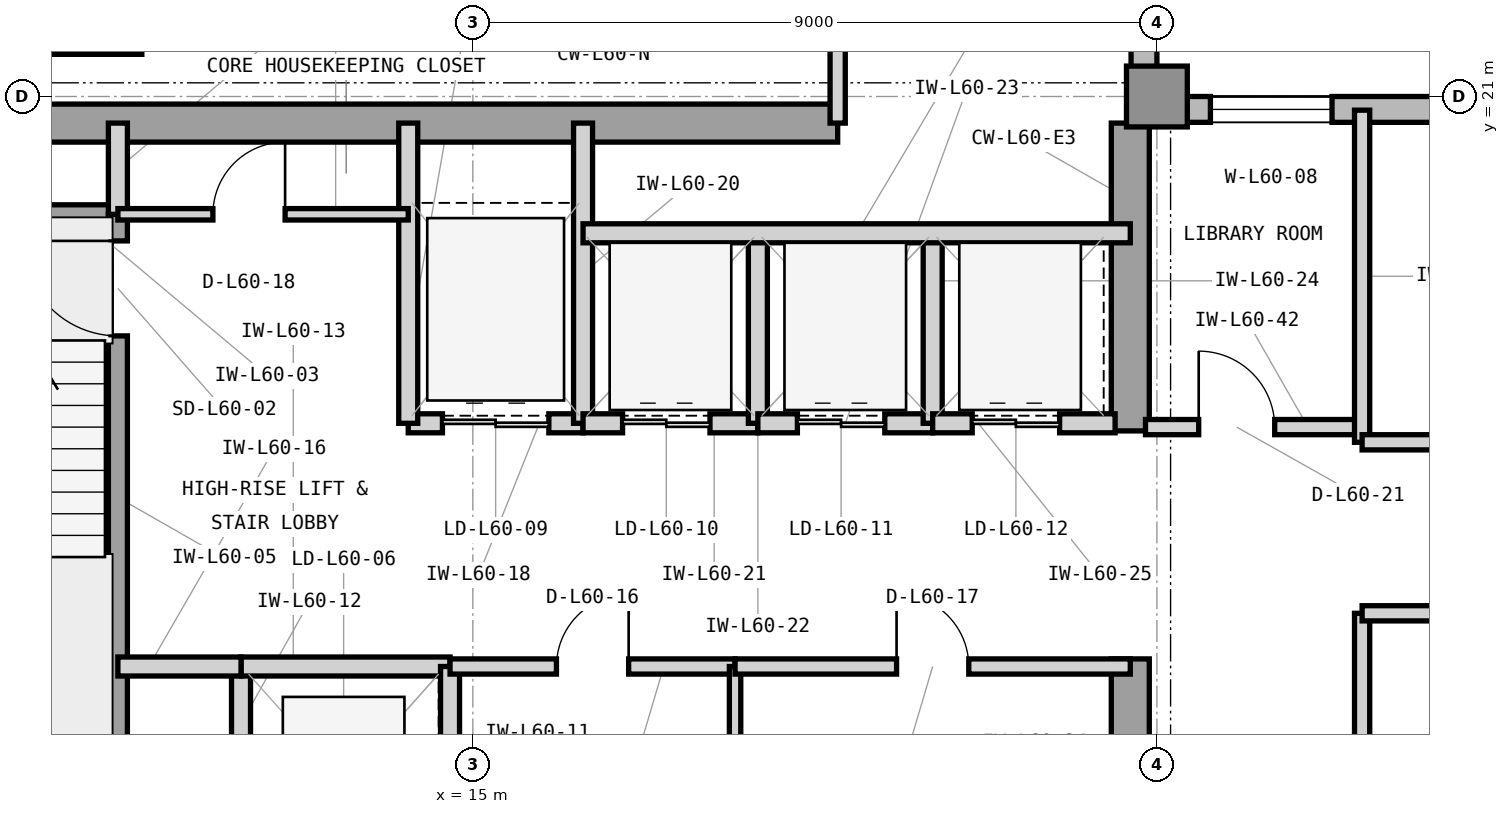
"""IFC4 building model, lengths in metres.
Left out: names, types, materials, properties, quantities, classifications, styles, units other than length and angle.
Written with IfcOpenShell. Run it as: python <this file> out.ifc"""

import sys

from ifc_helpers import new_model, si_unit, direction, frame, frame_2d, origin, origin_2d, place, context, subcontext, project, spatial, rectangle, extrude, element, fill, save


model = new_model("IFC4")
c1 = context("Model", 3, precision=1e-05, world=origin(), true_north=direction((0.0, 1.0)))
c2 = subcontext(c1, "Body", "Model", "MODEL_VIEW")
j1 = project(units=[si_unit("LENGTHUNIT", "METRE"), si_unit("PLANEANGLEUNIT", "RADIAN")], contexts=[c1])
p1 = place(None, origin())
s1 = spatial("IfcSite", under=j1, at=p1, CompositionType="ELEMENT")
p2 = place(p1, origin())
s2 = spatial("IfcBuilding", under=s1, at=p2, CompositionType="ELEMENT")
p3 = place(p2, frame((0.0, 0.0, 246.9)))
s3 = spatial("IfcBuildingStorey", under=s2, at=p3, CompositionType="ELEMENT", Elevation=246.9)
p4 = place(p3, frame((7.475, 20.65, 0.0), z_axis=(0.0, 0.0, 1.0), x_axis=(1.0, 0.0, 0.0)))
e1 = element("IfcWall", 1, at=p4, inside=s3, PredefinedType="SHEAR", context=c2, shape_type="SweptSolid", body=[
    extrude(rectangle(XDim=12.325, YDim=0.5, at=frame_2d((6.163, 0.0))), origin(), (0.0, 0.0, 1.0), 3.9),
])
p5 = place(p3, frame((23.65, 10.4, 0.0), z_axis=(0.0, 0.0, 1.0), x_axis=(0.0, 1.0, 0.0)))
e2 = element("IfcWall", 2, at=p5, inside=s3, PredefinedType="SHEAR", context=c2, shape_type="SweptSolid", body=[
    extrude(rectangle(XDim=3.2, YDim=0.5, at=frame_2d((1.6, 0.0))), origin(), (0.0, 0.0, 1.0), 3.9),
])
p6 = place(p3, frame((23.65, 16.6, 0.0), z_axis=(0.0, 0.0, 1.0), x_axis=(0.0, 1.0, 0.0)))
e3 = element("IfcWall", 3, at=p6, inside=s3, PredefinedType="SHEAR", context=c2, shape_type="SweptSolid", body=[
    extrude(rectangle(XDim=4.05, YDim=0.5, at=frame_2d((2.025, 0.0))), origin(), (0.0, 0.0, 1.0), 3.9),
])
p7 = place(p3, frame((24.0, 21.0, 0.0), z_axis=(0.0, 0.0, 1.0), x_axis=(1.0, 0.0, 0.0)))
e4 = element("IfcColumn", 4, at=p7, inside=s3, PredefinedType="COLUMN", context=c2, shape_type="SweptSolid", body=[
    extrude(rectangle(XDim=0.8, YDim=0.8, at=origin_2d()), origin(), (0.0, 0.0, 1.0), 3.9),
])
p8 = place(p3, frame((52.4, 20.83, 0.0), z_axis=(0.0, 0.0, 1.0), x_axis=(-1.0, 0.0, 0.0)))
e5 = element("IfcWall", 5, at=p8, inside=s3, PredefinedType="STANDARD", context=c2, shape_type="SweptSolid", body=[
    extrude(rectangle(XDim=28.4, YDim=0.34, at=frame_2d((14.2, 0.0))), origin(), (0.0, 0.0, 1.0), 3.7),
])
p9 = place(p8, frame((26.096, 0.0, 0.9)))
e6 = element("IfcOpeningElement", 6, at=p9, cuts=e5, PredefinedType="OPENING", context=c2, shape_type="SweptSolid", body=[
    extrude(rectangle(XDim=1.6, YDim=2.2, at=frame_2d((0.8, 1.1))), frame((0.0, 0.18, 0.0), z_axis=(0.0, -1.0, 0.0), x_axis=(1.0, 0.0, 0.0)), (0.0, 0.0, 1.0), 0.36),
])
p10 = place(p8, frame((11.375, 0.0, 0.9)))
e7 = element("IfcOpeningElement", 7, at=p10, cuts=e5, PredefinedType="OPENING", context=c2, shape_type="SweptSolid", body=[
    extrude(rectangle(XDim=2.3, YDim=2.2, at=frame_2d((1.15, 1.1))), frame((0.0, 0.18, 0.0), z_axis=(0.0, -1.0, 0.0), x_axis=(1.0, 0.0, 0.0)), (0.0, 0.0, 1.0), 0.36),
])
p11 = place(p3, frame((23.83, 21.0, 0.0), z_axis=(0.0, 0.0, 1.0), x_axis=(0.0, 1.0, 0.0)))
e8 = element("IfcWall", 8, at=p11, inside=s3, PredefinedType="STANDARD", context=c2, shape_type="SweptSolid", body=[
    extrude(rectangle(XDim=19.4, YDim=0.34, at=frame_2d((9.7, 0.0))), origin(), (0.0, 0.0, 1.0), 3.7),
])
p12 = place(p11, frame((10.975, 0.0, 0.9)))
e9 = element("IfcOpeningElement", 9, at=p12, cuts=e8, PredefinedType="OPENING", context=c2, shape_type="SweptSolid", body=[
    extrude(rectangle(XDim=2.3, YDim=2.2, at=frame_2d((1.15, 1.1))), frame((0.0, 0.18, 0.0), z_axis=(0.0, -1.0, 0.0), x_axis=(1.0, 0.0, 0.0)), (0.0, 0.0, 1.0), 0.36),
])
p13 = place(p3, frame((7.7, 19.45, 0.0), z_axis=(0.0, 0.0, 1.0), x_axis=(1.0, 0.0, 0.0)))
e10 = element("IfcWall", 10, at=p13, inside=s3, PredefinedType="SHEAR", context=c2, shape_type="SweptSolid", body=[
    extrude(rectangle(XDim=2.755, YDim=0.25, at=frame_2d((1.377, 0.0))), origin(), (0.0, 0.0, 1.0), 3.9),
])
p14 = place(p3, frame((10.33, 12.0, 0.0), z_axis=(0.0, 0.0, 1.0), x_axis=(0.0, 1.0, 0.0)))
e11 = element("IfcWall", 11, at=p14, inside=s3, PredefinedType="SHEAR", context=c2, shape_type="SweptSolid", body=[
    extrude(rectangle(XDim=7.45, YDim=0.25, at=frame_2d((3.725, 0.0))), origin(), (0.0, 0.0, 1.0), 3.9),
])
p15 = place(p14, frame((5.85, 0.0, 0.0)))
e12 = element("IfcOpeningElement", 12, at=p15, cuts=e11, PredefinedType="OPENING", context=c2, shape_type="SweptSolid", body=[
    extrude(rectangle(XDim=1.25, YDim=2.2, at=frame_2d((0.625, 1.1))), frame((0.0, 0.135, 0.0), z_axis=(0.0, -1.0, 0.0), x_axis=(1.0, 0.0, 0.0)), (0.0, 0.0, 1.0), 0.27),
])
p16 = place(p3, frame((10.33, 19.45, 0.0), z_axis=(0.0, 0.0, 1.0), x_axis=(0.0, 1.0, 0.0)))
e13 = element("IfcWall", 13, at=p16, inside=s3, PredefinedType="PARTITIONING", context=c2, shape_type="SweptSolid", body=[
    extrude(rectangle(XDim=1.2, YDim=0.25, at=frame_2d((0.6, 0.0))), origin(), (0.0, 0.0, 1.0), 3.69),
])
p17 = place(p3, frame((11.95, 10.5, 0.0), z_axis=(0.0, 0.0, 1.0), x_axis=(0.0, 1.0, 0.0)))
e14 = element("IfcWall", 14, at=p17, inside=s3, PredefinedType="PARTITIONING", context=c2, shape_type="SweptSolid", body=[
    extrude(rectangle(XDim=3.0, YDim=0.25, at=frame_2d((1.5, 0.0))), origin(), (0.0, 0.0, 1.0), 3.69),
])
p18 = place(p3, frame((11.95, 13.5, 0.0), z_axis=(0.0, 0.0, 1.0), x_axis=(1.0, 0.0, 0.0)))
e15 = element("IfcWall", 15, at=p18, inside=s3, PredefinedType="PARTITIONING", context=c2, shape_type="SweptSolid", body=[
    extrude(rectangle(XDim=2.75, YDim=0.25, at=frame_2d((1.375, 0.0))), origin(), (0.0, 0.0, 1.0), 3.073),
])
p19 = place(p3, frame((14.7, 10.5, 0.0), z_axis=(0.0, 0.0, 1.0), x_axis=(0.0, 1.0, 0.0)))
e16 = element("IfcWall", 16, at=p19, inside=s3, PredefinedType="PARTITIONING", context=c2, shape_type="SweptSolid", body=[
    extrude(rectangle(XDim=3.0, YDim=0.25, at=frame_2d((1.5, 0.0))), origin(), (0.0, 0.0, 1.0), 3.69),
])
p20 = place(p3, frame((10.33, 13.5, 0.0), z_axis=(0.0, 0.0, 1.0), x_axis=(1.0, 0.0, 0.0)))
e17 = element("IfcWall", 17, at=p20, inside=s3, PredefinedType="PARTITIONING", context=c2, shape_type="SweptSolid", body=[
    extrude(rectangle(XDim=1.62, YDim=0.25, at=frame_2d((0.81, 0.0))), origin(), (0.0, 0.0, 1.0), 3.073),
])
p21 = place(p3, frame((14.15, 16.7, 0.0), z_axis=(0.0, 0.0, 1.0), x_axis=(1.0, 0.0, 0.0)))
e18 = element("IfcWall", 18, at=p21, inside=s3, PredefinedType="PARTITIONING", context=c2, shape_type="SweptSolid", body=[
    extrude(rectangle(XDim=2.3, YDim=0.25, at=frame_2d((1.15, 0.0))), origin(), (0.0, 0.0, 1.0), 3.073),
])
p22 = place(p21, frame((0.45, 0.0, 0.0)))
e19 = element("IfcOpeningElement", 19, at=p22, cuts=e18, PredefinedType="OPENING", context=c2, shape_type="SweptSolid", body=[
    extrude(rectangle(XDim=1.4, YDim=2.35, at=frame_2d((0.7, 1.175))), frame((0.0, 0.135, 0.0), z_axis=(0.0, -1.0, 0.0), x_axis=(1.0, 0.0, 0.0)), (0.0, 0.0, 1.0), 0.27),
])
for number, where, z_axis, x_axis in (
    (20, (14.15, 16.7, 0.0), (0.0, 0.0, 1.0), (0.0, 1.0, 0.0)),
    (21, (16.45, 16.7, 0.0), (0.0, 0.0, 1.0), (0.0, 1.0, 0.0)),
):
    element("IfcWall", number, at=place(p3, frame(where, z_axis=z_axis, x_axis=x_axis)), inside=s3, PredefinedType="PARTITIONING", context=c2, shape_type="SweptSolid", body=[
        extrude(rectangle(XDim=3.95, YDim=0.25, at=frame_2d((1.975, 0.0))), origin(), (0.0, 0.0, 1.0), 3.69),
    ])
p23 = place(p3, frame((16.45, 16.7, 0.0), z_axis=(0.0, 0.0, 1.0), x_axis=(1.0, 0.0, 0.0)))
e22 = element("IfcWall", 22, at=p23, inside=s3, PredefinedType="PARTITIONING", context=c2, shape_type="SweptSolid", body=[
    extrude(rectangle(XDim=2.3, YDim=0.25, at=frame_2d((1.15, 0.0))), origin(), (0.0, 0.0, 1.0), 3.073),
])
p24 = place(p23, frame((0.52, 0.0, 0.0)))
e23 = element("IfcOpeningElement", 23, at=p24, cuts=e22, PredefinedType="OPENING", context=c2, shape_type="SweptSolid", body=[
    extrude(rectangle(XDim=1.15, YDim=2.25, at=frame_2d((0.575, 1.125))), frame((0.0, 0.135, 0.0), z_axis=(0.0, -1.0, 0.0), x_axis=(1.0, 0.0, 0.0)), (0.0, 0.0, 1.0), 0.27),
])
p25 = place(p3, frame((18.75, 16.7, 0.0), z_axis=(0.0, 0.0, 1.0), x_axis=(0.0, 1.0, 0.0)))
e24 = element("IfcWall", 24, at=p25, inside=s3, PredefinedType="PARTITIONING", context=c2, shape_type="SweptSolid", body=[
    extrude(rectangle(XDim=2.5, YDim=0.25, at=frame_2d((1.25, 0.0))), origin(), (0.0, 0.0, 1.0), 3.69),
])
p26 = place(p3, frame((18.75, 16.7, 0.0), z_axis=(0.0, 0.0, 1.0), x_axis=(1.0, 0.0, 0.0)))
e25 = element("IfcWall", 25, at=p26, inside=s3, PredefinedType="PARTITIONING", context=c2, shape_type="SweptSolid", body=[
    extrude(rectangle(XDim=2.3, YDim=0.25, at=frame_2d((1.15, 0.0))), origin(), (0.0, 0.0, 1.0), 3.073),
])
p27 = place(p26, frame((0.52, 0.0, 0.0)))
e26 = element("IfcOpeningElement", 26, at=p27, cuts=e25, PredefinedType="OPENING", context=c2, shape_type="SweptSolid", body=[
    extrude(rectangle(XDim=1.15, YDim=2.25, at=frame_2d((0.575, 1.125))), frame((0.0, 0.135, 0.0), z_axis=(0.0, -1.0, 0.0), x_axis=(1.0, 0.0, 0.0)), (0.0, 0.0, 1.0), 0.27),
])
p28 = place(p3, frame((21.05, 16.7, 0.0), z_axis=(0.0, 0.0, 1.0), x_axis=(0.0, 1.0, 0.0)))
e27 = element("IfcWall", 27, at=p28, inside=s3, PredefinedType="PARTITIONING", context=c2, shape_type="SweptSolid", body=[
    extrude(rectangle(XDim=2.5, YDim=0.25, at=frame_2d((1.25, 0.0))), origin(), (0.0, 0.0, 1.0), 3.69),
])
p29 = place(p3, frame((21.05, 16.7, 0.0), z_axis=(0.0, 0.0, 1.0), x_axis=(1.0, 0.0, 0.0)))
e28 = element("IfcWall", 28, at=p29, inside=s3, PredefinedType="PARTITIONING", context=c2, shape_type="SweptSolid", body=[
    extrude(rectangle(XDim=2.4, YDim=0.25, at=frame_2d((1.2, 0.0))), origin(), (0.0, 0.0, 1.0), 3.073),
])
p30 = place(p29, frame((0.52, 0.0, 0.0)))
e29 = element("IfcOpeningElement", 29, at=p30, cuts=e28, PredefinedType="OPENING", context=c2, shape_type="SweptSolid", body=[
    extrude(rectangle(XDim=1.15, YDim=2.25, at=frame_2d((0.575, 1.125))), frame((0.0, 0.135, 0.0), z_axis=(0.0, -1.0, 0.0), x_axis=(1.0, 0.0, 0.0)), (0.0, 0.0, 1.0), 0.27),
])
p31 = place(p3, frame((16.45, 19.2, 0.0), z_axis=(0.0, 0.0, 1.0), x_axis=(1.0, 0.0, 0.0)))
e30 = element("IfcWall", 30, at=p31, inside=s3, PredefinedType="PARTITIONING", context=c2, shape_type="SweptSolid", body=[
    extrude(rectangle(XDim=7.2, YDim=0.25, at=frame_2d((3.6, 0.0))), origin(), (0.0, 0.0, 1.0), 3.69),
])
p32 = place(p3, frame((14.7, 13.5, 0.0), z_axis=(0.0, 0.0, 1.0), x_axis=(1.0, 0.0, 0.0)))
e31 = element("IfcWall", 31, at=p32, inside=s3, PredefinedType="PARTITIONING", context=c2, shape_type="SweptSolid", body=[
    extrude(rectangle(XDim=3.75, YDim=0.2, at=frame_2d((1.875, 0.0))), origin(), (0.0, 0.0, 1.0), 3.073),
])
p33 = place(p32, frame((1.4, 0.0, 0.0)))
e32 = element("IfcOpeningElement", 32, at=p33, cuts=e31, PredefinedType="OPENING", context=c2, shape_type="SweptSolid", body=[
    extrude(rectangle(XDim=0.95, YDim=2.1, at=frame_2d((0.475, 1.05))), frame((0.0, 0.11, 0.0), z_axis=(0.0, -1.0, 0.0), x_axis=(1.0, 0.0, 0.0)), (0.0, 0.0, 1.0), 0.22),
])
p34 = place(p3, frame((18.45, 10.25, 0.0), z_axis=(0.0, 0.0, 1.0), x_axis=(0.0, 1.0, 0.0)))
e33 = element("IfcWall", 33, at=p34, inside=s3, PredefinedType="PARTITIONING", context=c2, shape_type="SweptSolid", body=[
    extrude(rectangle(XDim=3.25, YDim=0.15, at=frame_2d((1.625, 0.0))), origin(), (0.0, 0.0, 1.0), 3.69),
])
p35 = place(p3, frame((18.45, 13.5, 0.0), z_axis=(0.0, 0.0, 1.0), x_axis=(1.0, 0.0, 0.0)))
e34 = element("IfcWall", 34, at=p35, inside=s3, PredefinedType="PARTITIONING", context=c2, shape_type="SweptSolid", body=[
    extrude(rectangle(XDim=5.2, YDim=0.2, at=frame_2d((2.6, 0.0))), origin(), (0.0, 0.0, 1.0), 3.073),
])
p36 = place(p35, frame((2.125, 0.0, 0.0)))
e35 = element("IfcOpeningElement", 35, at=p36, cuts=e34, PredefinedType="OPENING", context=c2, shape_type="SweptSolid", body=[
    extrude(rectangle(XDim=0.95, YDim=2.1, at=frame_2d((0.475, 1.05))), frame((0.0, 0.11, 0.0), z_axis=(0.0, -1.0, 0.0), x_axis=(1.0, 0.0, 0.0)), (0.0, 0.0, 1.0), 0.22),
])
p37 = place(p3, frame((10.33, 19.45, 0.0), z_axis=(0.0, 0.0, 1.0), x_axis=(1.0, 0.0, 0.0)))
e36 = element("IfcWall", 36, at=p37, inside=s3, PredefinedType="PARTITIONING", context=c2, shape_type="SweptSolid", body=[
    extrude(rectangle(XDim=3.82, YDim=0.15, at=frame_2d((1.91, 0.0))), origin(), (0.0, 0.0, 1.0), 3.69),
])
p38 = place(p37, frame((1.25, 0.0, 0.0)))
e37 = element("IfcOpeningElement", 37, at=p38, cuts=e36, PredefinedType="OPENING", context=c2, shape_type="SweptSolid", body=[
    extrude(rectangle(XDim=0.95, YDim=2.1, at=frame_2d((0.475, 1.05))), frame((0.0, 0.085, 0.0), z_axis=(0.0, -1.0, 0.0), x_axis=(1.0, 0.0, 0.0)), (0.0, 0.0, 1.0), 0.17),
])
p39 = place(p3, frame((6.555, 21.68, 0.0), z_axis=(0.0, 0.0, 1.0), x_axis=(1.0, 0.0, 0.0)))
e38 = element("IfcWall", 38, at=p39, inside=s3, PredefinedType="SHEAR", context=c2, shape_type="SweptSolid", body=[
    extrude(rectangle(XDim=4.09, YDim=0.25, at=frame_2d((2.045, 0.0))), origin(), (0.0, 0.0, 1.0), 3.9),
])
p40 = place(p3, frame((23.85, 16.65, 0.0), z_axis=(0.0, 0.0, 1.0), x_axis=(1.0, 0.0, 0.0)))
e39 = element("IfcWall", 39, at=p40, inside=s3, PredefinedType="PARTITIONING", context=c2, shape_type="SweptSolid", body=[
    extrude(rectangle(XDim=2.85, YDim=0.2, at=frame_2d((1.425, 0.0))), origin(), (0.0, 0.0, 1.0), 3.69),
])
p41 = place(p40, frame((0.7, 0.0, 0.0)))
e40 = element("IfcOpeningElement", 40, at=p41, cuts=e39, PredefinedType="OPENING", context=c2, shape_type="SweptSolid", body=[
    extrude(rectangle(XDim=1.0, YDim=2.15, at=frame_2d((0.5, 1.075))), frame((0.0, 0.11, 0.0), z_axis=(0.0, -1.0, 0.0), x_axis=(1.0, 0.0, 0.0)), (0.0, 0.0, 1.0), 0.22),
])
p42 = place(p3, frame((26.7, 3.18, 0.0), z_axis=(0.0, 0.0, 1.0), x_axis=(0.0, 1.0, 0.0)))
e41 = element("IfcWall", 41, at=p42, inside=s3, PredefinedType="PARTITIONING", context=c2, shape_type="SweptSolid", body=[
    extrude(rectangle(XDim=11.02, YDim=0.2, at=frame_2d((5.51, 0.0))), origin(), (0.0, 0.0, 1.0), 3.69),
])
p43 = place(p3, frame((26.7, 16.45, 0.0), z_axis=(0.0, 0.0, 1.0), x_axis=(0.0, 1.0, 0.0)))
e42 = element("IfcWall", 42, at=p43, inside=s3, PredefinedType="PARTITIONING", context=c2, shape_type="SweptSolid", body=[
    extrude(rectangle(XDim=4.37, YDim=0.2, at=frame_2d((2.185, 0.0))), origin(), (0.0, 0.0, 1.0), 3.69),
])
p44 = place(p3, frame((26.7, 14.2, 0.0), z_axis=(0.0, 0.0, 1.0), x_axis=(1.0, 0.0, 0.0)))
e43 = element("IfcWall", 43, at=p44, inside=s3, PredefinedType="PARTITIONING", context=c2, shape_type="SweptSolid", body=[
    extrude(rectangle(XDim=7.5, YDim=0.2, at=frame_2d((3.75, 0.0))), origin(), (0.0, 0.0, 1.0), 3.69),
])
p45 = place(p44, frame((2.75, 0.0, 0.0)))
e44 = element("IfcOpeningElement", 44, at=p45, cuts=e43, PredefinedType="OPENING", context=c2, shape_type="SweptSolid", body=[
    extrude(rectangle(XDim=2.0, YDim=2.5, at=frame_2d((1.0, 1.25))), frame((0.0, 0.11, 0.0), z_axis=(0.0, -1.0, 0.0), x_axis=(1.0, 0.0, 0.0)), (0.0, 0.0, 1.0), 0.22),
])
p46 = place(p3, frame((26.7, 16.45, 0.0), z_axis=(0.0, 0.0, 1.0), x_axis=(1.0, 0.0, 0.0)))
e45 = element("IfcWall", 45, at=p46, inside=s3, PredefinedType="PARTITIONING", context=c2, shape_type="SweptSolid", body=[
    extrude(rectangle(XDim=10.0, YDim=0.2, at=frame_2d((5.0, 0.0))), origin(), (0.0, 0.0, 1.0), 3.69),
])
p47 = place(p46, frame((4.5, 0.0, 0.0)))
e46 = element("IfcOpeningElement", 46, at=p47, cuts=e45, PredefinedType="OPENING", context=c2, shape_type="SweptSolid", body=[
    extrude(rectangle(XDim=1.0, YDim=2.15, at=frame_2d((0.5, 1.075))), frame((0.0, 0.11, 0.0), z_axis=(0.0, -1.0, 0.0), x_axis=(1.0, 0.0, 0.0)), (0.0, 0.0, 1.0), 0.22),
])
p48 = place(p3, frame((19.8, 20.65, 0.0), z_axis=(0.0, 0.0, 1.0), x_axis=(0.0, 1.0, 0.0)))
e47 = element("IfcWall", 47, at=p48, inside=s3, PredefinedType="PARTITIONING", context=c2, shape_type="SweptSolid", body=[
    extrude(rectangle(XDim=6.15, YDim=0.2, at=frame_2d((3.075, 0.0))), origin(), (0.0, 0.0, 1.0), 3.69),
])
p49 = place(p15, origin())
e48 = element("IfcDoor", 48, at=p49, inside=s3, OperationType="SINGLE_SWING_RIGHT", PredefinedType="DOOR", context=c2, shape_type="SweptSolid", body=[
    extrude(rectangle(XDim=1.25, YDim=2.2, at=frame_2d((0.625, 1.1))), frame((0.0, 0.025, 0.0), z_axis=(0.0, -1.0, 0.0), x_axis=(1.0, 0.0, 0.0)), (0.0, 0.0, 1.0), 0.05),
])
fill(e12, e48)
p50 = place(p22, origin())
e49 = element("IfcDoor", 49, at=p50, inside=s3, OperationType="DOUBLE_DOOR_SLIDING", PredefinedType="DOOR", context=c2, shape_type="SweptSolid", body=[
    extrude(rectangle(XDim=1.4, YDim=2.35, at=frame_2d((0.7, 1.175))), frame((0.0, 0.025, 0.0), z_axis=(0.0, -1.0, 0.0), x_axis=(1.0, 0.0, 0.0)), (0.0, 0.0, 1.0), 0.05),
])
fill(e19, e49)
p51 = place(p24, origin())
e50 = element("IfcDoor", 50, at=p51, inside=s3, OperationType="DOUBLE_DOOR_SLIDING", PredefinedType="DOOR", context=c2, shape_type="SweptSolid", body=[
    extrude(rectangle(XDim=1.15, YDim=2.25, at=frame_2d((0.575, 1.125))), frame((0.0, 0.025, 0.0), z_axis=(0.0, -1.0, 0.0), x_axis=(1.0, 0.0, 0.0)), (0.0, 0.0, 1.0), 0.05),
])
fill(e23, e50)
p52 = place(p27, origin())
e51 = element("IfcDoor", 51, at=p52, inside=s3, OperationType="DOUBLE_DOOR_SLIDING", PredefinedType="DOOR", context=c2, shape_type="SweptSolid", body=[
    extrude(rectangle(XDim=1.15, YDim=2.25, at=frame_2d((0.575, 1.125))), frame((0.0, 0.025, 0.0), z_axis=(0.0, -1.0, 0.0), x_axis=(1.0, 0.0, 0.0)), (0.0, 0.0, 1.0), 0.05),
])
fill(e26, e51)
p53 = place(p30, origin())
e52 = element("IfcDoor", 52, at=p53, inside=s3, OperationType="DOUBLE_DOOR_SLIDING", PredefinedType="DOOR", context=c2, shape_type="SweptSolid", body=[
    extrude(rectangle(XDim=1.15, YDim=2.25, at=frame_2d((0.575, 1.125))), frame((0.0, 0.025, 0.0), z_axis=(0.0, -1.0, 0.0), x_axis=(1.0, 0.0, 0.0)), (0.0, 0.0, 1.0), 0.05),
])
fill(e29, e52)
p54 = place(p33, origin())
e53 = element("IfcDoor", 53, at=p54, inside=s3, OperationType="SINGLE_SWING_RIGHT", PredefinedType="DOOR", context=c2, shape_type="SweptSolid", body=[
    extrude(rectangle(XDim=0.95, YDim=2.1, at=frame_2d((0.475, 1.05))), frame((0.0, 0.025, 0.0), z_axis=(0.0, -1.0, 0.0), x_axis=(1.0, 0.0, 0.0)), (0.0, 0.0, 1.0), 0.05),
])
fill(e32, e53)
p55 = place(p36, origin())
e54 = element("IfcDoor", 54, at=p55, inside=s3, OperationType="SINGLE_SWING_LEFT", PredefinedType="DOOR", context=c2, shape_type="SweptSolid", body=[
    extrude(rectangle(XDim=0.95, YDim=2.1, at=frame_2d((0.475, 1.05))), frame((0.0, 0.025, 0.0), z_axis=(0.0, -1.0, 0.0), x_axis=(1.0, 0.0, 0.0)), (0.0, 0.0, 1.0), 0.05),
])
fill(e35, e54)
p56 = place(p38, origin())
e55 = element("IfcDoor", 55, at=p56, inside=s3, OperationType="SINGLE_SWING_RIGHT", PredefinedType="DOOR", context=c2, shape_type="SweptSolid", body=[
    extrude(rectangle(XDim=0.95, YDim=2.1, at=frame_2d((0.475, 1.05))), frame((0.0, 0.025, 0.0), z_axis=(0.0, -1.0, 0.0), x_axis=(1.0, 0.0, 0.0)), (0.0, 0.0, 1.0), 0.05),
])
fill(e37, e55)
p57 = place(p41, origin())
e56 = element("IfcDoor", 56, at=p57, inside=s3, OperationType="SINGLE_SWING_LEFT", PredefinedType="DOOR", context=c2, shape_type="SweptSolid", body=[
    extrude(rectangle(XDim=1.0, YDim=2.15, at=frame_2d((0.5, 1.075))), frame((0.0, 0.025, 0.0), z_axis=(0.0, -1.0, 0.0), x_axis=(1.0, 0.0, 0.0)), (0.0, 0.0, 1.0), 0.05),
])
fill(e40, e56)
p58 = place(p9, origin())
e57 = element("IfcWindow", 57, at=p58, inside=s3, PartitioningType="SINGLE_PANEL", PredefinedType="WINDOW", context=c2, shape_type="SweptSolid", body=[
    extrude(rectangle(XDim=1.6, YDim=2.2, at=frame_2d((0.8, 1.1))), frame((0.0, 0.11, 0.0), z_axis=(0.0, -1.0, 0.0), x_axis=(1.0, 0.0, 0.0)), (0.0, 0.0, 1.0), 0.06),
])
fill(e6, e57)
save(model, sys.argv[1])
